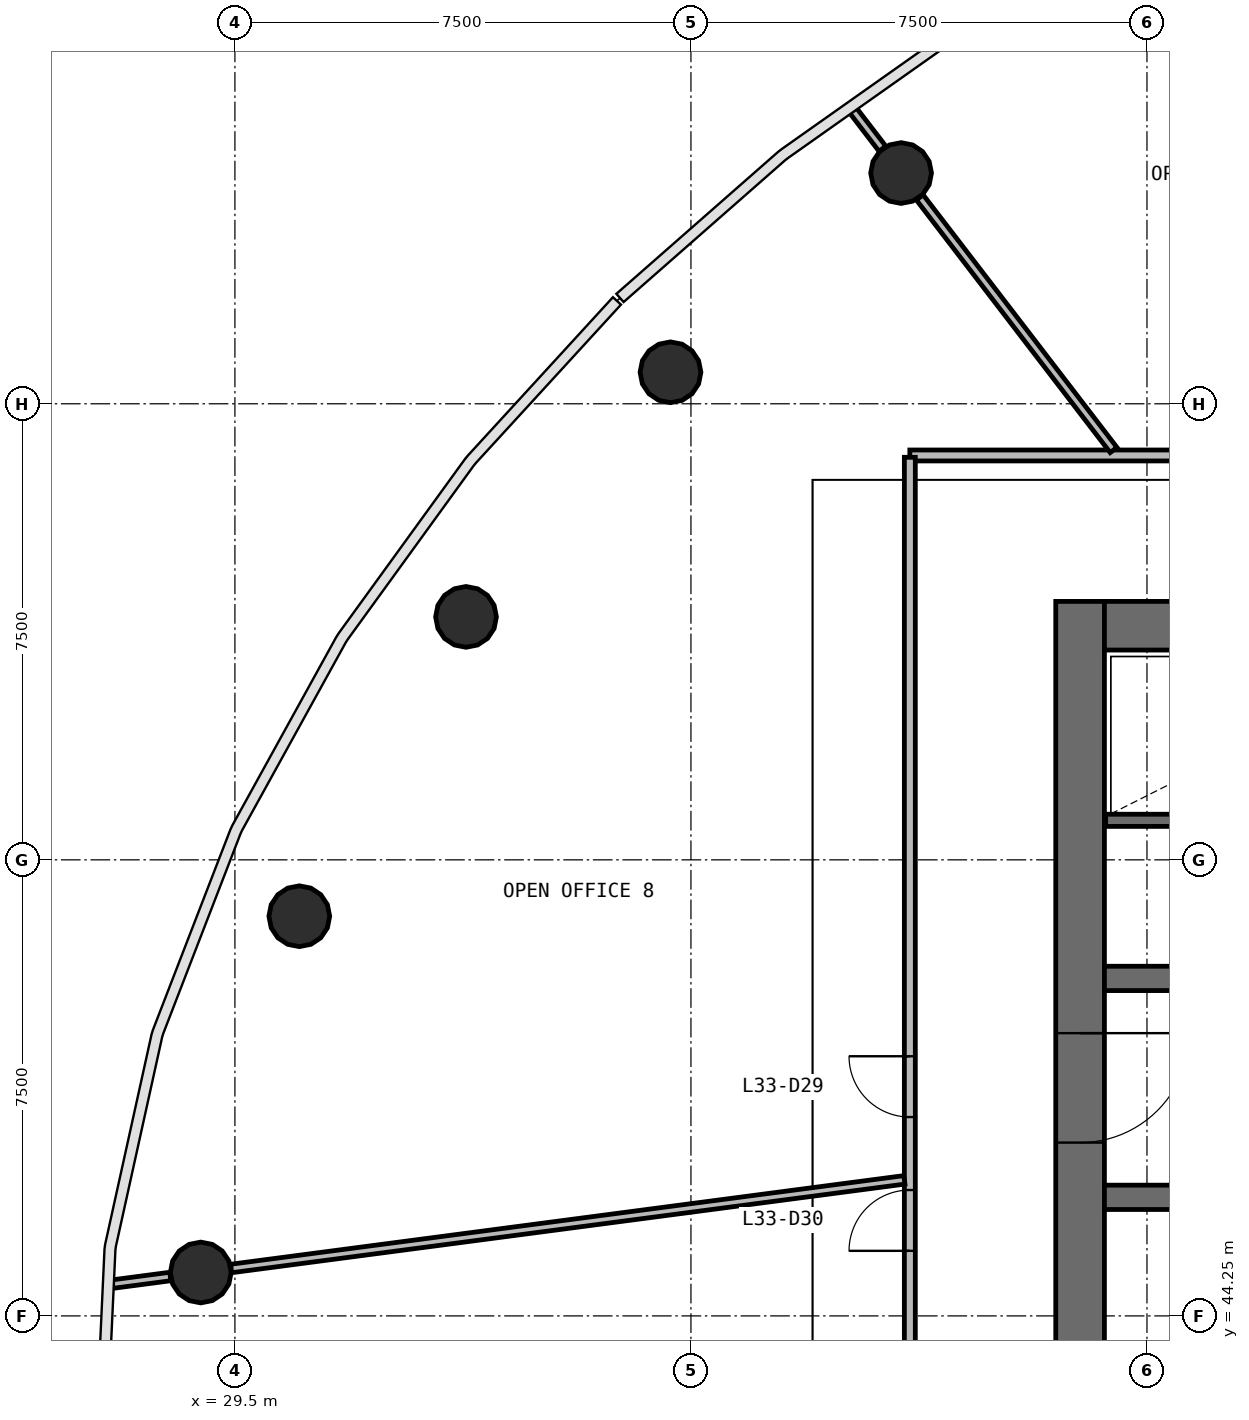
"""IFC4 building model, lengths in metres.
Left out: names, types, materials, properties, quantities, classifications, styles, units other than length and angle.
Written with IfcOpenShell. Run it as: python <this file> out.ifc"""

import sys

from ifc_helpers import new_model, si_unit, direction, frame, frame_2d, origin, origin_2d, place, context, subcontext, project, spatial, rectangle, circle, extrude, source, transform, mapped, element, fill, save


model = new_model("IFC4")
c1 = context("Model", 3, precision=1e-05, world=origin(), true_north=direction((0.0, 1.0)))
c2 = subcontext(c1, "Body", "Model", "MODEL_VIEW")
j1 = project(units=[si_unit("LENGTHUNIT", "METRE"), si_unit("PLANEANGLEUNIT", "RADIAN")], contexts=[c1])
p1 = place(None, origin())
s1 = spatial("IfcSite", under=j1, at=p1, CompositionType="ELEMENT")
p2 = place(p1, origin())
s2 = spatial("IfcBuilding", under=s1, at=p2, CompositionType="ELEMENT")
p3 = place(p2, frame((0.0, 0.0, 140.9)))
s3 = spatial("IfcBuildingStorey", under=s2, at=p3, CompositionType="ELEMENT", Elevation=140.9)
p4 = place(p3, frame((43.4, 56.0, 0.0), z_axis=(0.0, 0.0, 1.0), x_axis=(0.0, -1.0, 0.0)))
e1 = element("IfcWall", 1, at=p4, inside=s3, PredefinedType="SHEAR", context=c2, shape_type="SweptSolid", body=[
    extrude(rectangle(XDim=16.0, YDim=0.8, at=frame_2d((8.0, 0.0))), origin(), (0.0, 0.0, 1.0), 3.9),
])
p5 = place(p4, frame((7.1, 0.0, 0.0)))
e2 = element("IfcOpeningElement", 2, at=p5, cuts=e1, PredefinedType="OPENING", context=c2, shape_type="SweptSolid", body=[
    extrude(rectangle(XDim=1.8, YDim=2.1, at=frame_2d((0.9, 1.05))), frame((0.0, 0.41, 0.0), z_axis=(0.0, -1.0, 0.0), x_axis=(1.0, 0.0, 0.0)), (0.0, 0.0, 1.0), 0.82),
])
p6 = place(p3, frame((60.2, 55.6, 0.0), z_axis=(0.0, 0.0, 1.0), x_axis=(-1.0, 0.0, 0.0)))
e3 = element("IfcWall", 3, at=p6, inside=s3, PredefinedType="SHEAR", context=c2, shape_type="SweptSolid", body=[
    extrude(rectangle(XDim=16.4, YDim=0.8, at=frame_2d((8.2, 0.0))), origin(), (0.0, 0.0, 1.0), 3.9),
])
p7 = place(p6, frame((0.2, 0.0, 0.0)))
e4 = element("IfcOpeningElement", 4, at=p7, cuts=e3, PredefinedType="OPENING", context=c2, shape_type="SweptSolid", body=[
    extrude(rectangle(XDim=1.1, YDim=2.1, at=frame_2d((0.55, 1.05))), frame((0.0, 0.41, 0.0), z_axis=(0.0, -1.0, 0.0), x_axis=(1.0, 0.0, 0.0)), (0.0, 0.0, 1.0), 0.82),
])
p8 = place(p6, frame((10.1, 0.0, 0.0)))
e5 = element("IfcOpeningElement", 5, at=p8, cuts=e3, PredefinedType="OPENING", context=c2, shape_type="SweptSolid", body=[
    extrude(rectangle(XDim=1.2, YDim=2.1, at=frame_2d((0.6, 1.05))), frame((0.0, 0.41, 0.0), z_axis=(0.0, -1.0, 0.0), x_axis=(1.0, 0.0, 0.0)), (0.0, 0.0, 1.0), 0.82),
])
p9 = place(p6, frame((7.05, 0.0, 0.0)))
e6 = element("IfcOpeningElement", 6, at=p9, cuts=e3, PredefinedType="OPENING", context=c2, shape_type="SweptSolid", body=[
    extrude(rectangle(XDim=1.1, YDim=2.1, at=frame_2d((0.55, 1.05))), frame((0.0, 0.41, 0.0), z_axis=(0.0, -1.0, 0.0), x_axis=(1.0, 0.0, 0.0)), (0.0, 0.0, 1.0), 0.82),
])
p10 = place(p3, frame((43.8, 49.8, 0.0), z_axis=(0.0, 0.0, 1.0), x_axis=(1.0, 0.0, 0.0)))
e7 = element("IfcWall", 7, at=p10, inside=s3, PredefinedType="SHEAR", context=c2, shape_type="SweptSolid", body=[
    extrude(rectangle(XDim=16.4, YDim=0.4, at=frame_2d((8.2, 0.0))), origin(), (0.0, 0.0, 1.0), 3.9),
])
p11 = place(p10, frame((9.6, 0.0, 0.0)))
e8 = element("IfcOpeningElement", 8, at=p11, cuts=e7, PredefinedType="OPENING", context=c2, shape_type="SweptSolid", body=[
    extrude(rectangle(XDim=1.1, YDim=2.1, at=frame_2d((0.55, 1.05))), frame((0.0, 0.21, 0.0), z_axis=(0.0, -1.0, 0.0), x_axis=(1.0, 0.0, 0.0)), (0.0, 0.0, 1.0), 0.42),
])
p12 = place(p10, frame((12.1, 0.0, 0.0)))
e9 = element("IfcOpeningElement", 9, at=p12, cuts=e7, PredefinedType="OPENING", context=c2, shape_type="SweptSolid", body=[
    extrude(rectangle(XDim=1.1, YDim=2.1, at=frame_2d((0.55, 1.05))), frame((0.0, 0.21, 0.0), z_axis=(0.0, -1.0, 0.0), x_axis=(1.0, 0.0, 0.0)), (0.0, 0.0, 1.0), 0.42),
])
p13 = place(p10, frame((14.6, 0.0, 0.0)))
e10 = element("IfcOpeningElement", 10, at=p13, cuts=e7, PredefinedType="OPENING", context=c2, shape_type="SweptSolid", body=[
    extrude(rectangle(XDim=1.1, YDim=2.1, at=frame_2d((0.55, 1.05))), frame((0.0, 0.21, 0.0), z_axis=(0.0, -1.0, 0.0), x_axis=(1.0, 0.0, 0.0)), (0.0, 0.0, 1.0), 0.42),
])
p14 = place(p10, frame((4.25, 0.0, 0.0)))
e11 = element("IfcOpeningElement", 11, at=p14, cuts=e7, PredefinedType="OPENING", context=c2, shape_type="SweptSolid", body=[
    extrude(rectangle(XDim=0.9, YDim=2.1, at=frame_2d((0.45, 1.05))), frame((0.0, 0.21, 0.0), z_axis=(0.0, -1.0, 0.0), x_axis=(1.0, 0.0, 0.0)), (0.0, 0.0, 1.0), 0.42),
])
p15 = place(p10, frame((7.65, 0.0, 0.0)))
e12 = element("IfcOpeningElement", 12, at=p15, cuts=e7, PredefinedType="OPENING", context=c2, shape_type="SweptSolid", body=[
    extrude(rectangle(XDim=0.9, YDim=2.1, at=frame_2d((0.45, 1.05))), frame((0.0, 0.21, 0.0), z_axis=(0.0, -1.0, 0.0), x_axis=(1.0, 0.0, 0.0)), (0.0, 0.0, 1.0), 0.42),
])
p16 = place(p3, frame((43.8, 46.2, 0.0), z_axis=(0.0, 0.0, 1.0), x_axis=(1.0, 0.0, 0.0)))
e13 = element("IfcWall", 13, at=p16, inside=s3, PredefinedType="SHEAR", context=c2, shape_type="SweptSolid", body=[
    extrude(rectangle(XDim=16.4, YDim=0.4, at=frame_2d((8.2, 0.0))), origin(), (0.0, 0.0, 1.0), 3.9),
])
p17 = place(p16, frame((9.6, 0.0, 0.0)))
e14 = element("IfcOpeningElement", 14, at=p17, cuts=e13, PredefinedType="OPENING", context=c2, shape_type="SweptSolid", body=[
    extrude(rectangle(XDim=1.1, YDim=2.1, at=frame_2d((0.55, 1.05))), frame((0.0, 0.21, 0.0), z_axis=(0.0, -1.0, 0.0), x_axis=(1.0, 0.0, 0.0)), (0.0, 0.0, 1.0), 0.42),
])
p18 = place(p16, frame((12.1, 0.0, 0.0)))
e15 = element("IfcOpeningElement", 15, at=p18, cuts=e13, PredefinedType="OPENING", context=c2, shape_type="SweptSolid", body=[
    extrude(rectangle(XDim=1.1, YDim=2.1, at=frame_2d((0.55, 1.05))), frame((0.0, 0.21, 0.0), z_axis=(0.0, -1.0, 0.0), x_axis=(1.0, 0.0, 0.0)), (0.0, 0.0, 1.0), 0.42),
])
p19 = place(p16, frame((14.6, 0.0, 0.0)))
e16 = element("IfcOpeningElement", 16, at=p19, cuts=e13, PredefinedType="OPENING", context=c2, shape_type="SweptSolid", body=[
    extrude(rectangle(XDim=1.1, YDim=2.1, at=frame_2d((0.55, 1.05))), frame((0.0, 0.21, 0.0), z_axis=(0.0, -1.0, 0.0), x_axis=(1.0, 0.0, 0.0)), (0.0, 0.0, 1.0), 0.42),
])
p20 = place(p16, frame((7.65, 0.0, 0.0)))
e17 = element("IfcOpeningElement", 17, at=p20, cuts=e13, PredefinedType="OPENING", context=c2, shape_type="SweptSolid", body=[
    extrude(rectangle(XDim=0.9, YDim=2.1, at=frame_2d((0.45, 1.05))), frame((0.0, 0.21, 0.0), z_axis=(0.0, -1.0, 0.0), x_axis=(1.0, 0.0, 0.0)), (0.0, 0.0, 1.0), 0.42),
])
m1 = source(origin(), c2, "Body", "SweptSolid", [
    extrude(circle(Radius=0.5, at=origin_2d()), origin(), (0.0, 0.0, 1.0), 3.9),
])
for number, where, z_axis, x_axis in (
    (18, (40.456, 63.044, 0.0), (0.0, 0.0, 1.0), (1.0, 0.0, 0.0)),
    (19, (36.664, 59.768, 0.0), (0.0, 0.0, 1.0), (1.0, 0.0, 0.0)),
    (20, (33.301, 55.746, 0.0), (0.0, 0.0, 1.0), (1.0, 0.0, 0.0)),
    (21, (30.559, 50.823, 0.0), (0.0, 0.0, 1.0), (1.0, 0.0, 0.0)),
    (22, (28.938, 44.964, 0.0), (0.0, 0.0, 1.0), (1.0, 0.0, 0.0)),
):
    element("IfcColumn", number, at=place(p3, frame(where, z_axis=z_axis, x_axis=x_axis)), inside=s3, PredefinedType="COLUMN", context=c2, shape_type="MappedRepresentation", body=[
        mapped(m1, transform((0.0, 0.0, 0.0), scale=1.0)),
    ])
p21 = place(p3, frame((43.82, 52.4, 0.0), z_axis=(0.0, 0.0, 1.0), x_axis=(1.0, 0.0, 0.0)))
e23 = element("IfcWall", 23, at=p21, inside=s3, PredefinedType="SOLIDWALL", context=c2, shape_type="SweptSolid", body=[
    extrude(rectangle(XDim=6.58, YDim=0.2, at=frame_2d((3.29, 0.0))), origin(), (0.0, 0.0, 1.0), 3.58),
])
p22 = place(p3, frame((40.6, 58.4, 0.0), z_axis=(0.0, 0.0, 1.0), x_axis=(1.0, 0.0, 0.0)))
e24 = element("IfcWall", 24, at=p22, inside=s3, PredefinedType="PARTITIONING", context=c2, shape_type="SweptSolid", body=[
    extrude(rectangle(XDim=22.8, YDim=0.18, at=frame_2d((11.4, 0.0))), origin(), (0.0, 0.0, 1.0), 2.88),
])
p23 = place(p22, frame((16.15, 0.0, 0.0)))
e25 = element("IfcOpeningElement", 25, at=p23, cuts=e24, PredefinedType="OPENING", context=c2, shape_type="SweptSolid", body=[
    extrude(rectangle(XDim=1.0, YDim=2.1, at=frame_2d((0.5, 1.05))), frame((0.0, 0.1, 0.0), z_axis=(0.0, -1.0, 0.0), x_axis=(1.0, 0.0, 0.0)), (0.0, 0.0, 1.0), 0.2),
])
p24 = place(p22, frame((10.95, 0.0, 0.0)))
e26 = element("IfcOpeningElement", 26, at=p24, cuts=e24, PredefinedType="OPENING", context=c2, shape_type="SweptSolid", body=[
    extrude(rectangle(XDim=1.0, YDim=2.1, at=frame_2d((0.5, 1.05))), frame((0.0, 0.1, 0.0), z_axis=(0.0, -1.0, 0.0), x_axis=(1.0, 0.0, 0.0)), (0.0, 0.0, 1.0), 0.2),
])
p25 = place(p22, frame((8.75, 0.0, 0.0)))
e27 = element("IfcOpeningElement", 27, at=p25, cuts=e24, PredefinedType="OPENING", context=c2, shape_type="SweptSolid", body=[
    extrude(rectangle(XDim=1.0, YDim=2.1, at=frame_2d((0.5, 1.05))), frame((0.0, 0.1, 0.0), z_axis=(0.0, -1.0, 0.0), x_axis=(1.0, 0.0, 0.0)), (0.0, 0.0, 1.0), 0.2),
])
p26 = place(p3, frame((40.6, 37.63, 0.0), z_axis=(0.0, 0.0, 1.0), x_axis=(0.0, 1.0, 0.0)))
e28 = element("IfcWall", 28, at=p26, inside=s3, PredefinedType="PARTITIONING", context=c2, shape_type="SweptSolid", body=[
    extrude(rectangle(XDim=20.74, YDim=0.18, at=frame_2d((10.37, 0.0))), origin(), (0.0, 0.0, 1.0), 2.88),
])
p27 = place(p26, frame((9.89, 0.0, 0.0)))
e29 = element("IfcOpeningElement", 29, at=p27, cuts=e28, PredefinedType="OPENING", context=c2, shape_type="SweptSolid", body=[
    extrude(rectangle(XDim=1.0, YDim=2.1, at=frame_2d((0.5, 1.05))), frame((0.0, 0.1, 0.0), z_axis=(0.0, -1.0, 0.0), x_axis=(1.0, 0.0, 0.0)), (0.0, 0.0, 1.0), 0.2),
])
p28 = place(p26, frame((7.69, 0.0, 0.0)))
e30 = element("IfcOpeningElement", 30, at=p28, cuts=e28, PredefinedType="OPENING", context=c2, shape_type="SweptSolid", body=[
    extrude(rectangle(XDim=1.0, YDim=2.1, at=frame_2d((0.5, 1.05))), frame((0.0, 0.1, 0.0), z_axis=(0.0, -1.0, 0.0), x_axis=(1.0, 0.0, 0.0)), (0.0, 0.0, 1.0), 0.2),
])
p29 = place(p3, frame((40.51, 46.487, 0.0), z_axis=(0.0, 0.0, 1.0), x_axis=(-0.991446480727, -0.130513891423, 0.0)))
e31 = element("IfcWall", 31, at=p29, inside=s3, PredefinedType="PARTITIONING", context=c2, shape_type="SweptSolid", body=[
    extrude(rectangle(XDim=11.167, YDim=0.14, at=frame_2d((5.584, 0.0))), origin(), (0.0, 0.0, 1.0), 2.88),
])
p30 = place(p3, frame((43.951, 58.49, 0.0), z_axis=(0.0, 0.0, 1.0), x_axis=(-0.608736894437, 0.793372165728, 0.0)))
e32 = element("IfcWall", 32, at=p30, inside=s3, PredefinedType="PARTITIONING", context=c2, shape_type="SweptSolid", body=[
    extrude(rectangle(XDim=5.236, YDim=0.14, at=frame_2d((2.618, 0.0))), origin(), (0.0, 0.0, 1.0), 2.88),
])
p31 = place(p3, frame((28.438, 44.898, 0.0), z_axis=(0.0, 0.0, 1.0), x_axis=(-0.991448245314, -0.130500486067, 0.0)))
e33 = element("IfcWall", 33, at=p31, inside=s3, PredefinedType="PARTITIONING", context=c2, shape_type="SweptSolid", body=[
    extrude(rectangle(XDim=0.962, YDim=0.14, at=frame_2d((0.481, 0.0))), origin(), (0.0, 0.0, 1.0), 2.88),
])
p32 = place(p3, frame((40.149, 63.445, 0.0), z_axis=(0.0, 0.0, 1.0), x_axis=(-0.608760344495, 0.793354172467, 0.0)))
e34 = element("IfcWall", 34, at=p32, inside=s3, PredefinedType="PARTITIONING", context=c2, shape_type="SweptSolid", body=[
    extrude(rectangle(XDim=0.795, YDim=0.14, at=frame_2d((0.397, 0.0))), origin(), (0.0, 0.0, 1.0), 2.88),
])
m2 = source(origin(), c2, "Body", "SweptSolid", [
    extrude(rectangle(XDim=1.8, YDim=2.1, at=frame_2d((0.9, 1.05))), frame((0.0, 0.025, 0.0), z_axis=(0.0, -1.0, 0.0), x_axis=(1.0, 0.0, 0.0)), (0.0, 0.0, 1.0), 0.05),
])
p33 = place(p5, origin())
e35 = element("IfcDoor", 35, at=p33, inside=s3, OperationType="SINGLE_SWING_LEFT", PredefinedType="DOOR", context=c2, shape_type="MappedRepresentation", body=[
    mapped(m2, transform((0.0, 0.0, 0.0), scale=1.0)),
])
fill(e2, e35)
m3 = source(origin(), c2, "Body", "SweptSolid", [
    extrude(rectangle(XDim=1.0, YDim=2.1, at=frame_2d((0.5, 1.05))), frame((0.0, 0.025, 0.0), z_axis=(0.0, -1.0, 0.0), x_axis=(1.0, 0.0, 0.0)), (0.0, 0.0, 1.0), 0.05),
])
p34 = place(p27, origin())
e36 = element("IfcDoor", 36, at=p34, inside=s3, OperationType="SINGLE_SWING_RIGHT", PredefinedType="DOOR", context=c2, shape_type="MappedRepresentation", body=[
    mapped(m3, transform((0.0, 0.0, 0.0), scale=1.0)),
])
fill(e29, e36)
p35 = place(p28, origin())
e37 = element("IfcDoor", 37, at=p35, inside=s3, OperationType="SINGLE_SWING_LEFT", PredefinedType="DOOR", context=c2, shape_type="MappedRepresentation", body=[
    mapped(m3, transform((0.0, 0.0, 0.0), scale=1.0)),
])
fill(e30, e37)
save(model, sys.argv[1])
